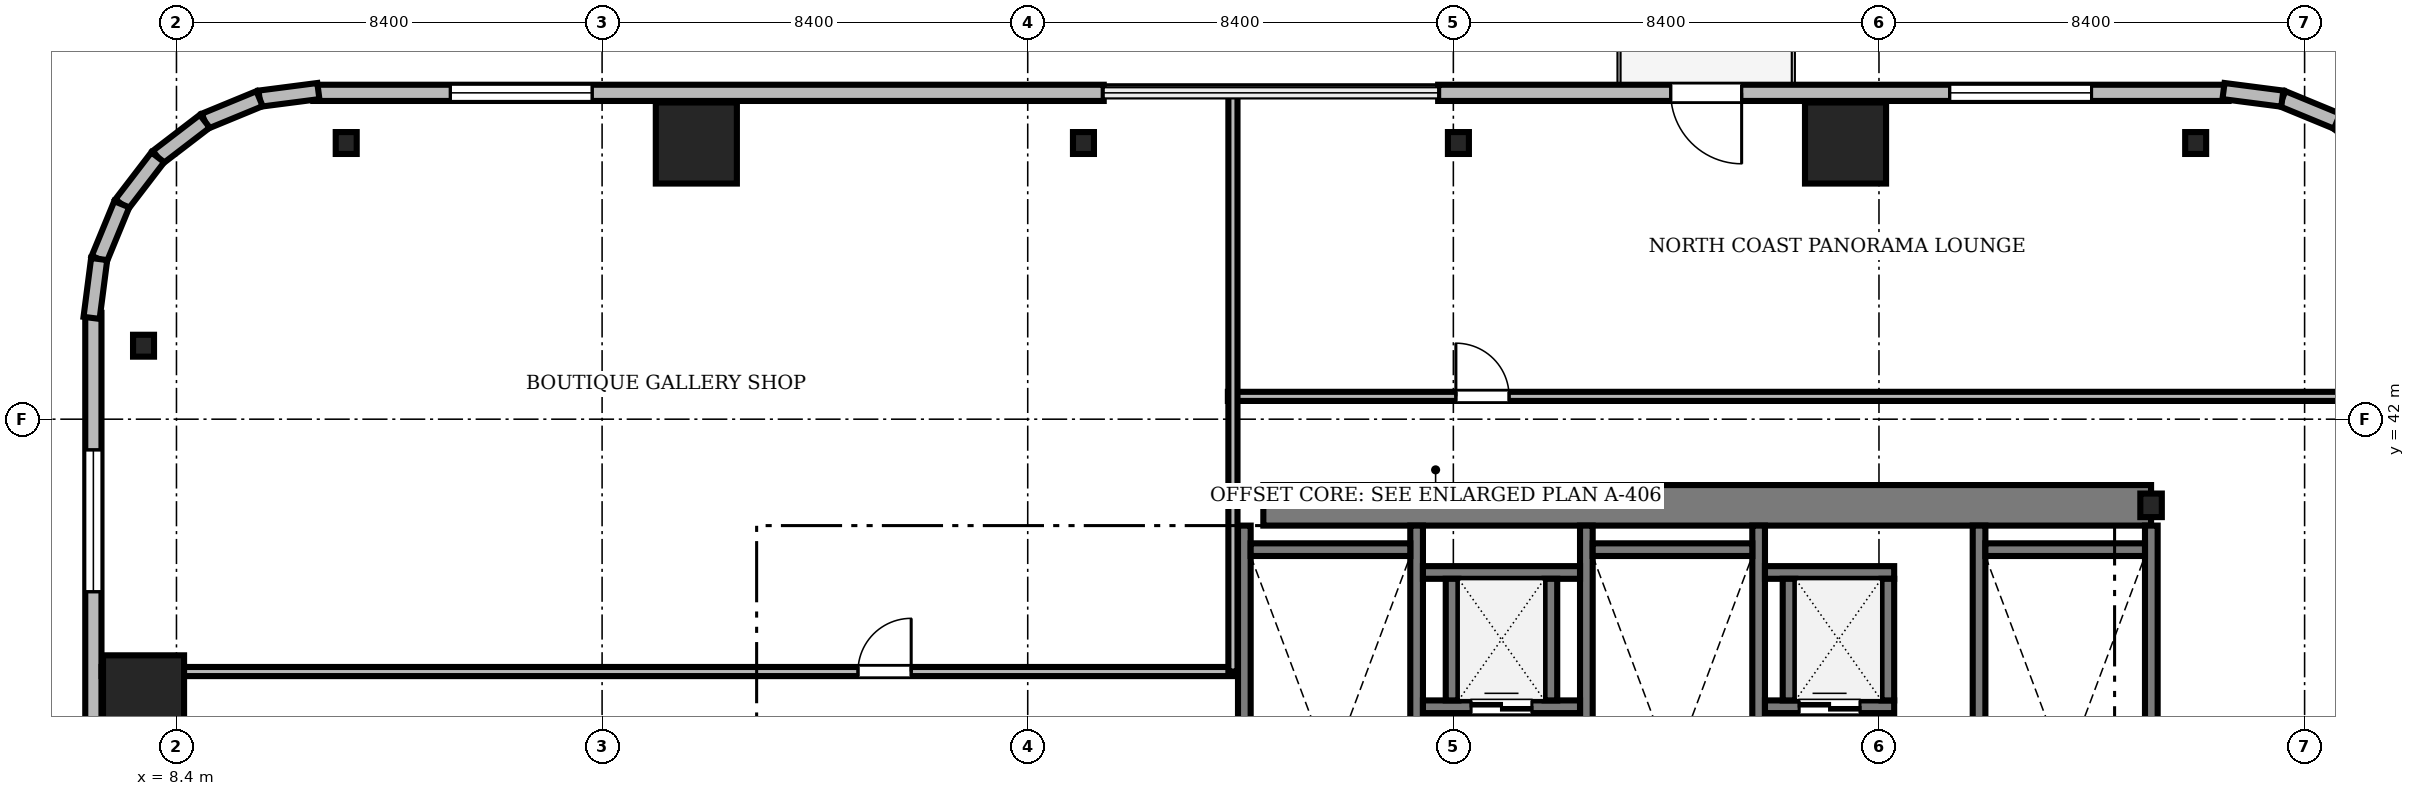
"""IFC4 building model, lengths in metres.
Left out: names, types, materials, properties, quantities, classifications, styles, units other than length and angle.
Written with IfcOpenShell. Run it as: python <this file> out.ifc"""

import sys

from ifc_helpers import new_model, si_unit, direction, frame, frame_2d, origin, origin_2d, place, context, subcontext, project, spatial, rectangle, i_section, extrude, source, transform, mapped, element, fill, save


model = new_model("IFC4")
c1 = context("Model", 3, precision=1e-05, world=origin(), true_north=direction((0.0, 1.0)))
c2 = subcontext(c1, "Body", "Model", "MODEL_VIEW")
j1 = project(units=[si_unit("LENGTHUNIT", "METRE"), si_unit("PLANEANGLEUNIT", "RADIAN")], contexts=[c1])
p1 = place(None, origin())
s1 = spatial("IfcSite", under=j1, at=p1, CompositionType="ELEMENT")
p2 = place(p1, origin())
s2 = spatial("IfcBuilding", under=s1, at=p2, CompositionType="ELEMENT")
p3 = place(p2, frame((0.0, 0.0, 118.7)))
s3 = spatial("IfcBuildingStorey", under=s2, at=p3, CompositionType="ELEMENT", Elevation=118.7)
m1 = source(origin(), c2, "Body", "SweptSolid", [
    extrude(rectangle(XDim=17.52, YDim=0.8, at=frame_2d((8.76, 0.0))), origin(), (0.0, 0.0, 1.0), 3.46),
])
p4 = place(p3, frame((29.85, 40.3, 0.0), z_axis=(0.0, 0.0, 1.0), x_axis=(1.0, 0.0, 0.0)))
e1 = element("IfcWall", 1, at=p4, inside=s3, PredefinedType="SHEAR", context=c2, shape_type="MappedRepresentation", body=[
    mapped(m1, transform((0.0, 0.0, 0.0), scale=1.0)),
])
m2 = source(origin(), c2, "Body", "SweptSolid", [
    extrude(i_section(OverallWidth=0.424, OverallDepth=0.465, WebThickness=0.035, FlangeThickness=0.056, FilletRadius=0.015, at=origin_2d()), origin(), (0.0, 0.0, 1.0), 3.46),
])
p5 = place(p3, frame((47.37, 40.3, 0.0), z_axis=(0.0, 0.0, 1.0), x_axis=(1.0, 0.0, 0.0)))
e2 = element("IfcColumn", 2, at=p5, inside=s3, PredefinedType="COLUMN", context=c2, shape_type="MappedRepresentation", body=[
    mapped(m2, transform((0.0, 0.0, 0.0), scale=1.0)),
])
m3 = source(origin(), c2, "Body", "SweptSolid", [
    extrude(rectangle(XDim=1.6, YDim=1.6, at=origin_2d()), origin(), (0.0, 0.0, 1.0), 3.46),
])
for number, where, z_axis, x_axis in (
    (3, (41.34, 47.45, 0.0), (0.0, 0.0, 1.0), (1.0, 0.0, 0.0)),
    (4, (18.66, 47.45, 0.0), (0.0, 0.0, 1.0), (1.0, 0.0, 0.0)),
    (5, (7.75, 36.54, 0.0), (0.0, 0.0, 1.0), (1.0, 0.0, 0.0)),
):
    element("IfcColumn", number, at=place(p3, frame(where, z_axis=z_axis, x_axis=x_axis)), inside=s3, PredefinedType="COLUMN", context=c2, shape_type="MappedRepresentation", body=[
        mapped(m3, transform((0.0, 0.0, 0.0), scale=1.0)),
    ])
m4 = source(origin(), c2, "Body", "SweptSolid", [
    extrude(i_section(OverallWidth=0.414, OverallDepth=0.432, WebThickness=0.026, FlangeThickness=0.04, FilletRadius=0.015, at=origin_2d()), origin(), (0.0, 0.0, 1.0), 3.46),
])
for number, where, z_axis, x_axis in (
    (6, (48.25, 47.45, 0.0), (0.0, 0.0, 1.0), (1.0, 0.0, 0.0)),
    (7, (33.7, 47.45, 0.0), (0.0, 0.0, 1.0), (1.0, 0.0, 0.0)),
    (8, (26.3, 47.45, 0.0), (0.0, 0.0, 1.0), (1.0, 0.0, 0.0)),
    (9, (11.75, 47.45, 0.0), (0.0, 0.0, 1.0), (1.0, 0.0, 0.0)),
    (10, (7.75, 43.45, 0.0), (0.0, 0.0, 1.0), (1.0, 0.0, 0.0)),
):
    element("IfcColumn", number, at=place(p3, frame(where, z_axis=z_axis, x_axis=x_axis)), inside=s3, PredefinedType="COLUMN", context=c2, shape_type="MappedRepresentation", body=[
        mapped(m4, transform((0.0, 0.0, 0.0), scale=1.0)),
    ])
m5 = source(origin(), c2, "Body", "SweptSolid", [
    extrude(rectangle(XDim=15.6, YDim=0.32, at=frame_2d((7.8, 0.0))), origin(), (0.0, 0.0, 1.0), 3.46),
])
p6 = place(p3, frame((48.9, 48.44, 0.0), z_axis=(0.0, 0.0, 1.0), x_axis=(-1.0, 0.0, 0.0)))
e11 = element("IfcWall", 11, at=p6, inside=s3, PredefinedType="SOLIDWALL", context=c2, shape_type="MappedRepresentation", body=[
    mapped(m5, transform((0.0, 0.0, 0.0), scale=1.0)),
])
m6 = source(origin(), c2, "Body", "SweptSolid", [
    extrude(rectangle(XDim=1.4, YDim=2.3, at=frame_2d((0.7, 1.15))), frame((0.0, 0.17, 0.0), z_axis=(0.0, -1.0, 0.0), x_axis=(1.0, 0.0, 0.0)), (0.0, 0.0, 1.0), 0.34),
])
p7 = place(p6, frame((9.61, 0.0, 0.0)))
e12 = element("IfcOpeningElement", 12, at=p7, cuts=e11, PredefinedType="OPENING", context=c2, shape_type="MappedRepresentation", body=[
    mapped(m6, transform((0.0, 0.0, 0.0), scale=1.0)),
])
m7 = source(origin(), c2, "Body", "SweptSolid", [
    extrude(rectangle(XDim=2.8, YDim=2.4, at=frame_2d((1.4, 1.2))), frame((0.0, 0.17, 0.0), z_axis=(0.0, -1.0, 0.0), x_axis=(1.0, 0.0, 0.0)), (0.0, 0.0, 1.0), 0.34),
])
p8 = place(p6, frame((2.705, 0.0, 0.72)))
e13 = element("IfcOpeningElement", 13, at=p8, cuts=e11, PredefinedType="OPENING", context=c2, shape_type="MappedRepresentation", body=[
    mapped(m7, transform((0.0, 0.0, 0.0), scale=1.0)),
])
p9 = place(p3, frame((26.7, 48.44, 0.0), z_axis=(0.0, 0.0, 1.0), x_axis=(-1.0, 0.0, 0.0)))
e14 = element("IfcWall", 14, at=p9, inside=s3, PredefinedType="SOLIDWALL", context=c2, shape_type="MappedRepresentation", body=[
    mapped(m5, transform((0.0, 0.0, 0.0), scale=1.0)),
])
p10 = place(p9, frame((10.095, 0.0, 0.72)))
e15 = element("IfcOpeningElement", 15, at=p10, cuts=e14, PredefinedType="OPENING", context=c2, shape_type="MappedRepresentation", body=[
    mapped(m7, transform((0.0, 0.0, 0.0), scale=1.0)),
])
m8 = source(origin(), c2, "Body", "SweptSolid", [
    extrude(rectangle(XDim=15.6, YDim=0.32, at=frame_2d((7.8, 0.0))), origin(), (0.0, 0.0, 1.0), 3.46),
])
p11 = place(p3, frame((6.76, 44.1, 0.0), z_axis=(0.0, 0.0, 1.0), x_axis=(0.0, -1.0, 0.0)))
e16 = element("IfcWall", 16, at=p11, inside=s3, PredefinedType="SOLIDWALL", context=c2, shape_type="MappedRepresentation", body=[
    mapped(m8, transform((0.0, 0.0, 0.0), scale=1.0)),
])
p12 = place(p11, frame((9.61, 0.0, 0.0)))
e17 = element("IfcOpeningElement", 17, at=p12, cuts=e16, PredefinedType="OPENING", context=c2, shape_type="MappedRepresentation", body=[
    mapped(m6, transform((0.0, 0.0, 0.0), scale=1.0)),
])
p13 = place(p11, frame((2.705, 0.0, 0.72)))
e18 = element("IfcOpeningElement", 18, at=p13, cuts=e16, PredefinedType="OPENING", context=c2, shape_type="MappedRepresentation", body=[
    mapped(m7, transform((0.0, 0.0, 0.0), scale=1.0)),
])
m9 = source(origin(), c2, "Body", "SweptSolid", [
    extrude(rectangle(XDim=1.169, YDim=0.32, at=frame_2d((0.584, 0.0))), origin(), (0.0, 0.0, 1.0), 3.46),
])
p14 = place(p3, frame((51.969, 47.169, 0.0), z_axis=(0.0, 0.0, 1.0), x_axis=(-0.793663520347, 0.608356981114, 0.0)))
e19 = element("IfcWall", 19, at=p14, inside=s3, PredefinedType="SOLIDWALL", context=c2, shape_type="MappedRepresentation", body=[
    mapped(m9, transform((0.0, 0.0, 0.0), scale=1.0)),
])
m10 = source(origin(), c2, "Body", "SweptSolid", [
    extrude(rectangle(XDim=1.169, YDim=0.32, at=frame_2d((0.584, 0.0))), origin(), (0.0, 0.0, 1.0), 3.46),
])
p15 = place(p3, frame((51.041, 47.88, 0.0), z_axis=(0.0, 0.0, 1.0), x_axis=(-0.924552646638, 0.381054331552, 0.0)))
e20 = element("IfcWall", 20, at=p15, inside=s3, PredefinedType="SOLIDWALL", context=c2, shape_type="MappedRepresentation", body=[
    mapped(m10, transform((0.0, 0.0, 0.0), scale=1.0)),
])
m11 = source(origin(), c2, "Body", "SweptSolid", [
    extrude(rectangle(XDim=1.17, YDim=0.32, at=frame_2d((0.585, 0.0))), origin(), (0.0, 0.0, 1.0), 3.46),
])
for number, where, z_axis, x_axis in (
    (21, (49.96, 48.325, 0.0), (0.0, 0.0, 1.0), (-0.992, 0.128, 0.0)),
    (22, (11.2, 48.476, 0.0), (0.0, 0.0, 1.0), (-0.992, -0.128, 0.0)),
):
    element("IfcWall", number, at=place(p3, frame(where, z_axis=z_axis, x_axis=x_axis)), inside=s3, PredefinedType="SOLIDWALL", context=c2, shape_type="MappedRepresentation", body=[
        mapped(m11, transform((0.0, 0.0, 0.0), scale=1.0)),
    ])
p16 = place(p3, frame((10.04, 48.325, 0.0), z_axis=(0.0, 0.0, 1.0), x_axis=(-0.924552646638, -0.381054331552, 0.0)))
e23 = element("IfcWall", 23, at=p16, inside=s3, PredefinedType="SOLIDWALL", context=c2, shape_type="MappedRepresentation", body=[
    mapped(m10, transform((0.0, 0.0, 0.0), scale=1.0)),
])
p17 = place(p3, frame((8.959, 47.88, 0.0), z_axis=(0.0, 0.0, 1.0), x_axis=(-0.793663520347, -0.608356981114, 0.0)))
e24 = element("IfcWall", 24, at=p17, inside=s3, PredefinedType="SOLIDWALL", context=c2, shape_type="MappedRepresentation", body=[
    mapped(m9, transform((0.0, 0.0, 0.0), scale=1.0)),
])
m12 = source(origin(), c2, "Body", "SweptSolid", [
    extrude(rectangle(XDim=1.169, YDim=0.32, at=frame_2d((0.584, 0.0))), origin(), (0.0, 0.0, 1.0), 3.46),
])
p18 = place(p3, frame((8.031, 47.169, 0.0), z_axis=(0.0, 0.0, 1.0), x_axis=(-0.608387696831, -0.793639975269, 0.0)))
e25 = element("IfcWall", 25, at=p18, inside=s3, PredefinedType="SOLIDWALL", context=c2, shape_type="MappedRepresentation", body=[
    mapped(m12, transform((0.0, 0.0, 0.0), scale=1.0)),
])
p19 = place(p3, frame((7.32, 46.241, 0.0), z_axis=(0.0, 0.0, 1.0), x_axis=(-0.381054331552, -0.924552646638, 0.0)))
e26 = element("IfcWall", 26, at=p19, inside=s3, PredefinedType="SOLIDWALL", context=c2, shape_type="MappedRepresentation", body=[
    mapped(m10, transform((0.0, 0.0, 0.0), scale=1.0)),
])
p20 = place(p3, frame((6.875, 45.16, 0.0), z_axis=(0.0, 0.0, 1.0), x_axis=(-0.128295670475, -0.991735963317, 0.0)))
e27 = element("IfcWall", 27, at=p20, inside=s3, PredefinedType="SOLIDWALL", context=c2, shape_type="MappedRepresentation", body=[
    mapped(m11, transform((0.0, 0.0, 0.0), scale=1.0)),
])
m13 = source(origin(), c2, "Body", "SweptSolid", [
    extrude(rectangle(XDim=9.25, YDim=0.25, at=frame_2d((4.625, 0.0))), origin(), (0.0, 0.0, 1.0), 3.5),
])
for number, where, z_axis, x_axis in (
    (28, (29.475, 30.65, 0.0), (0.0, 0.0, 1.0), (0.0, 1.0, 0.0)),
    (29, (32.875, 30.65, 0.0), (0.0, 0.0, 1.0), (0.0, 1.0, 0.0)),
):
    element("IfcWall", number, at=place(p3, frame(where, z_axis=z_axis, x_axis=x_axis)), inside=s3, PredefinedType="SOLIDWALL", context=c2, shape_type="MappedRepresentation", body=[
        mapped(m13, transform((0.0, 0.0, 0.0), scale=1.0)),
    ])
m14 = source(origin(), c2, "Body", "SweptSolid", [
    extrude(rectangle(XDim=3.15, YDim=0.25, at=frame_2d((1.575, 0.0))), origin(), (0.0, 0.0, 1.0), 3.5),
])
p21 = place(p3, frame((29.6, 39.425, 0.0), z_axis=(0.0, 0.0, 1.0), x_axis=(1.0, 0.0, 0.0)))
e30 = element("IfcWall", 30, at=p21, inside=s3, PredefinedType="SOLIDWALL", context=c2, shape_type="MappedRepresentation", body=[
    mapped(m14, transform((0.0, 0.0, 0.0), scale=1.0)),
])
for number, where, z_axis, x_axis in (
    (31, (36.225, 30.65, 0.0), (0.0, 0.0, 1.0), (0.0, 1.0, 0.0)),
    (32, (39.625, 30.65, 0.0), (0.0, 0.0, 1.0), (0.0, 1.0, 0.0)),
):
    element("IfcWall", number, at=place(p3, frame(where, z_axis=z_axis, x_axis=x_axis)), inside=s3, PredefinedType="SOLIDWALL", context=c2, shape_type="MappedRepresentation", body=[
        mapped(m13, transform((0.0, 0.0, 0.0), scale=1.0)),
    ])
p22 = place(p3, frame((36.35, 39.425, 0.0), z_axis=(0.0, 0.0, 1.0), x_axis=(1.0, 0.0, 0.0)))
e33 = element("IfcWall", 33, at=p22, inside=s3, PredefinedType="SOLIDWALL", context=c2, shape_type="MappedRepresentation", body=[
    mapped(m14, transform((0.0, 0.0, 0.0), scale=1.0)),
])
for number, where, z_axis, x_axis in (
    (34, (43.975, 30.65, 0.0), (0.0, 0.0, 1.0), (0.0, 1.0, 0.0)),
    (35, (47.375, 30.65, 0.0), (0.0, 0.0, 1.0), (0.0, 1.0, 0.0)),
):
    element("IfcWall", number, at=place(p3, frame(where, z_axis=z_axis, x_axis=x_axis)), inside=s3, PredefinedType="SOLIDWALL", context=c2, shape_type="MappedRepresentation", body=[
        mapped(m13, transform((0.0, 0.0, 0.0), scale=1.0)),
    ])
p23 = place(p3, frame((44.1, 39.425, 0.0), z_axis=(0.0, 0.0, 1.0), x_axis=(1.0, 0.0, 0.0)))
e36 = element("IfcWall", 36, at=p23, inside=s3, PredefinedType="SOLIDWALL", context=c2, shape_type="MappedRepresentation", body=[
    mapped(m14, transform((0.0, 0.0, 0.0), scale=1.0)),
])
m15 = source(origin(), c2, "Body", "SweptSolid", [
    extrude(rectangle(XDim=3.1, YDim=0.25, at=frame_2d((1.55, 0.0))), origin(), (0.0, 0.0, 1.0), 3.46),
])
p24 = place(p3, frame((33.0, 36.325, 0.0), z_axis=(0.0, 0.0, 1.0), x_axis=(1.0, 0.0, 0.0)))
e37 = element("IfcWall", 37, at=p24, inside=s3, PredefinedType="SOLIDWALL", context=c2, shape_type="MappedRepresentation", body=[
    mapped(m15, transform((0.0, 0.0, 0.0), scale=1.0)),
])
m16 = source(origin(), c2, "Body", "SweptSolid", [
    extrude(rectangle(XDim=1.2, YDim=2.25, at=frame_2d((0.6, 1.125))), frame((0.0, 0.135, 0.0), z_axis=(0.0, -1.0, 0.0), x_axis=(1.0, 0.0, 0.0)), (0.0, 0.0, 1.0), 0.27),
])
p25 = place(p24, frame((0.95, 0.0, 0.0)))
e38 = element("IfcOpeningElement", 38, at=p25, cuts=e37, PredefinedType="OPENING", context=c2, shape_type="MappedRepresentation", body=[
    mapped(m16, transform((0.0, 0.0, 0.0), scale=1.0)),
])
p26 = place(p3, frame((33.0, 38.975, 0.0), z_axis=(0.0, 0.0, 1.0), x_axis=(1.0, 0.0, 0.0)))
e39 = element("IfcWall", 39, at=p26, inside=s3, PredefinedType="SOLIDWALL", context=c2, shape_type="MappedRepresentation", body=[
    mapped(m15, transform((0.0, 0.0, 0.0), scale=1.0)),
])
m17 = source(origin(), c2, "Body", "SweptSolid", [
    extrude(rectangle(XDim=2.4, YDim=0.25, at=frame_2d((1.2, 0.0))), origin(), (0.0, 0.0, 1.0), 3.46),
])
for number, where, z_axis, x_axis in (
    (40, (33.575, 36.45, 0.0), (0.0, 0.0, 1.0), (0.0, 1.0, 0.0)),
    (41, (35.525, 36.45, 0.0), (0.0, 0.0, 1.0), (0.0, 1.0, 0.0)),
):
    element("IfcWall", number, at=place(p3, frame(where, z_axis=z_axis, x_axis=x_axis)), inside=s3, PredefinedType="SOLIDWALL", context=c2, shape_type="MappedRepresentation", body=[
        mapped(m17, transform((0.0, 0.0, 0.0), scale=1.0)),
    ])
m18 = source(origin(), c2, "Body", "SweptSolid", [
    extrude(rectangle(XDim=2.55, YDim=0.25, at=frame_2d((1.275, 0.0))), origin(), (0.0, 0.0, 1.0), 3.46),
])
p27 = place(p3, frame((39.75, 36.325, 0.0), z_axis=(0.0, 0.0, 1.0), x_axis=(1.0, 0.0, 0.0)))
e42 = element("IfcWall", 42, at=p27, inside=s3, PredefinedType="SOLIDWALL", context=c2, shape_type="MappedRepresentation", body=[
    mapped(m18, transform((0.0, 0.0, 0.0), scale=1.0)),
])
p28 = place(p27, frame((0.675, 0.0, 0.0)))
e43 = element("IfcOpeningElement", 43, at=p28, cuts=e42, PredefinedType="OPENING", context=c2, shape_type="MappedRepresentation", body=[
    mapped(m16, transform((0.0, 0.0, 0.0), scale=1.0)),
])
p29 = place(p3, frame((39.75, 38.975, 0.0), z_axis=(0.0, 0.0, 1.0), x_axis=(1.0, 0.0, 0.0)))
e44 = element("IfcWall", 44, at=p29, inside=s3, PredefinedType="SOLIDWALL", context=c2, shape_type="MappedRepresentation", body=[
    mapped(m18, transform((0.0, 0.0, 0.0), scale=1.0)),
])
for number, where, z_axis, x_axis in (
    (45, (40.225, 36.45, 0.0), (0.0, 0.0, 1.0), (0.0, 1.0, 0.0)),
    (46, (42.175, 36.45, 0.0), (0.0, 0.0, 1.0), (0.0, 1.0, 0.0)),
):
    element("IfcWall", number, at=place(p3, frame(where, z_axis=z_axis, x_axis=x_axis)), inside=s3, PredefinedType="SOLIDWALL", context=c2, shape_type="MappedRepresentation", body=[
        mapped(m17, transform((0.0, 0.0, 0.0), scale=1.0)),
    ])
m19 = source(origin(), c2, "Body", "SweptSolid", [
    extrude(rectangle(XDim=23.928, YDim=0.18, at=frame_2d((11.964, 0.0))), origin(), (0.0, 0.0, 1.0), 2.702),
])
p30 = place(p3, frame((29.15, 42.45, 0.0), z_axis=(0.0, 0.0, 1.0), x_axis=(1.0, 0.0, 0.0)))
e47 = element("IfcWall", 47, at=p30, inside=s3, PredefinedType="PARTITIONING", context=c2, shape_type="MappedRepresentation", body=[
    mapped(m19, transform((0.0, 0.0, 0.0), scale=1.0)),
])
m20 = source(origin(), c2, "Body", "SweptSolid", [
    extrude(rectangle(XDim=1.05, YDim=2.2, at=frame_2d((0.525, 1.1))), frame((0.0, 0.1, 0.0), z_axis=(0.0, -1.0, 0.0), x_axis=(1.0, 0.0, 0.0)), (0.0, 0.0, 1.0), 0.2),
])
p31 = place(p30, frame((4.5, 0.0, 0.0)))
e48 = element("IfcOpeningElement", 48, at=p31, cuts=e47, PredefinedType="OPENING", context=c2, shape_type="MappedRepresentation", body=[
    mapped(m20, transform((0.0, 0.0, 0.0), scale=1.0)),
])
m21 = source(origin(), c2, "Body", "SweptSolid", [
    extrude(rectangle(XDim=22.328, YDim=0.18, at=frame_2d((11.164, 0.0))), origin(), (0.0, 0.0, 1.0), 2.702),
])
p32 = place(p3, frame((6.922, 37.02, 0.0), z_axis=(0.0, 0.0, 1.0), x_axis=(1.0, 0.0, 0.0)))
e49 = element("IfcWall", 49, at=p32, inside=s3, PredefinedType="PARTITIONING", context=c2, shape_type="MappedRepresentation", body=[
    mapped(m21, transform((0.0, 0.0, 0.0), scale=1.0)),
])
p33 = place(p32, frame((14.928, 0.0, 0.0)))
e50 = element("IfcOpeningElement", 50, at=p33, cuts=e49, PredefinedType="OPENING", context=c2, shape_type="MappedRepresentation", body=[
    mapped(m20, transform((0.0, 0.0, 0.0), scale=1.0)),
])
m22 = source(origin(), c2, "Body", "SweptSolid", [
    extrude(rectangle(XDim=11.45, YDim=0.18, at=frame_2d((5.725, 0.0))), origin(), (0.0, 0.0, 1.0), 2.702),
])
p34 = place(p3, frame((29.25, 37.02, 0.0), z_axis=(0.0, 0.0, 1.0), x_axis=(0.0, 1.0, 0.0)))
e51 = element("IfcWall", 51, at=p34, inside=s3, PredefinedType="PARTITIONING", context=c2, shape_type="MappedRepresentation", body=[
    mapped(m22, transform((0.0, 0.0, 0.0), scale=1.0)),
])
m23 = source(origin(), c2, "Body", "SweptSolid", [
    extrude(rectangle(XDim=1.4, YDim=2.3, at=frame_2d((0.7, 1.15))), frame((0.0, 0.025, 0.0), z_axis=(0.0, -1.0, 0.0), x_axis=(1.0, 0.0, 0.0)), (0.0, 0.0, 1.0), 0.05),
])
p35 = place(p7, frame((1.4, 0.0, 0.0), z_axis=(0.0, 0.0, 1.0), x_axis=(-1.0, 0.0, 0.0)))
e52 = element("IfcDoor", 52, at=p35, inside=s3, OperationType="DOUBLE_DOOR_SLIDING", PredefinedType="DOOR", context=c2, shape_type="MappedRepresentation", body=[
    mapped(m23, transform((0.0, 0.0, 0.0), scale=1.0)),
])
fill(e12, e52)
m24 = source(origin(), c2, "Body", "SweptSolid", [
    extrude(rectangle(XDim=2.8, YDim=2.4, at=frame_2d((1.4, 1.2))), frame((0.0, 0.03, 0.0), z_axis=(0.0, -1.0, 0.0), x_axis=(1.0, 0.0, 0.0)), (0.0, 0.0, 1.0), 0.06),
])
p36 = place(p8, origin())
e53 = element("IfcWindow", 53, at=p36, inside=s3, PartitioningType="SINGLE_PANEL", PredefinedType="WINDOW", context=c2, shape_type="MappedRepresentation", body=[
    mapped(m24, transform((0.0, 0.0, 0.0), scale=1.0)),
])
fill(e13, e53)
p37 = place(p10, origin())
e54 = element("IfcWindow", 54, at=p37, inside=s3, PartitioningType="SINGLE_PANEL", PredefinedType="WINDOW", context=c2, shape_type="MappedRepresentation", body=[
    mapped(m24, transform((0.0, 0.0, 0.0), scale=1.0)),
])
fill(e15, e54)
p38 = place(p13, origin())
e55 = element("IfcWindow", 55, at=p38, inside=s3, PartitioningType="SINGLE_PANEL", PredefinedType="WINDOW", context=c2, shape_type="MappedRepresentation", body=[
    mapped(m24, transform((0.0, 0.0, 0.0), scale=1.0)),
])
fill(e18, e55)
m25 = source(origin(), c2, "Body", "SweptSolid", [
    extrude(rectangle(XDim=1.2, YDim=2.25, at=frame_2d((0.6, 1.125))), frame((0.0, 0.025, 0.0), z_axis=(0.0, -1.0, 0.0), x_axis=(1.0, 0.0, 0.0)), (0.0, 0.0, 1.0), 0.05),
])
p39 = place(p25, origin())
e56 = element("IfcDoor", 56, at=p39, inside=s3, OperationType="DOUBLE_DOOR_SLIDING", PredefinedType="DOOR", context=c2, shape_type="MappedRepresentation", body=[
    mapped(m25, transform((0.0, 0.0, 0.0), scale=1.0)),
])
fill(e38, e56)
p40 = place(p28, origin())
e57 = element("IfcDoor", 57, at=p40, inside=s3, OperationType="DOUBLE_DOOR_SLIDING", PredefinedType="DOOR", context=c2, shape_type="MappedRepresentation", body=[
    mapped(m25, transform((0.0, 0.0, 0.0), scale=1.0)),
])
fill(e43, e57)
m26 = source(origin(), c2, "Body", "SweptSolid", [
    extrude(rectangle(XDim=1.05, YDim=2.2, at=frame_2d((0.525, 1.1))), frame((0.0, 0.025, 0.0), z_axis=(0.0, -1.0, 0.0), x_axis=(1.0, 0.0, 0.0)), (0.0, 0.0, 1.0), 0.05),
])
p41 = place(p31, origin())
e58 = element("IfcDoor", 58, at=p41, inside=s3, OperationType="SINGLE_SWING_LEFT", PredefinedType="DOOR", context=c2, shape_type="MappedRepresentation", body=[
    mapped(m26, transform((0.0, 0.0, 0.0), scale=1.0)),
])
fill(e48, e58)
p42 = place(p33, origin())
e59 = element("IfcDoor", 59, at=p42, inside=s3, OperationType="SINGLE_SWING_RIGHT", PredefinedType="DOOR", context=c2, shape_type="MappedRepresentation", body=[
    mapped(m26, transform((0.0, 0.0, 0.0), scale=1.0)),
])
fill(e50, e59)
save(model, sys.argv[1])
